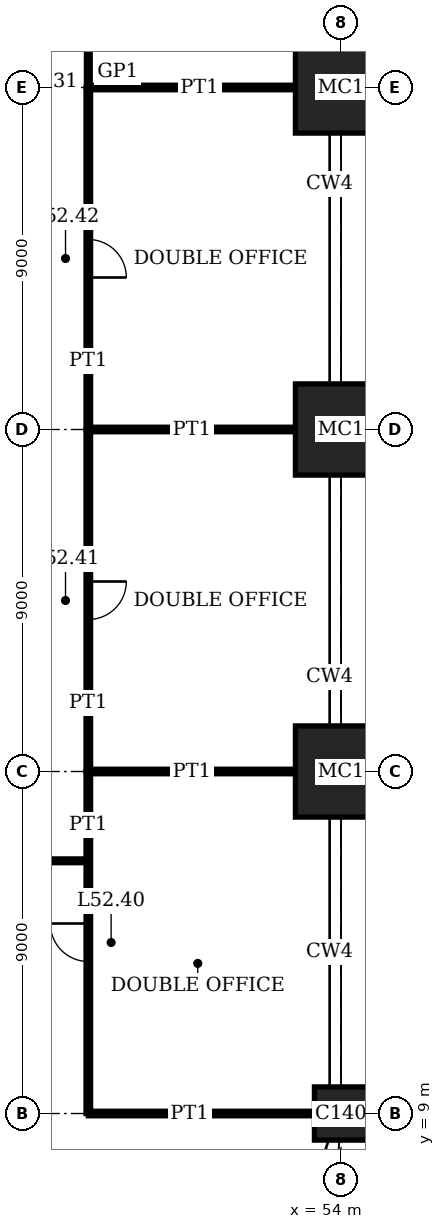
"""IFC4 building model, lengths in metres.
Left out: names, types, materials, properties, quantities, classifications, styles, units other than length and angle.
Written with IfcOpenShell. Run it as: python <this file> out.ifc"""

import sys

from ifc_helpers import new_model, si_unit, direction, frame, frame_2d, origin, origin_2d, place, context, subcontext, project, spatial, rectangle, extrude, element, fill, save


model = new_model("IFC4")
c1 = context("Model", 3, precision=1e-05, world=origin(), true_north=direction((0.0, 1.0)))
c2 = subcontext(c1, "Body", "Model", "MODEL_VIEW")
j1 = project(units=[si_unit("LENGTHUNIT", "METRE"), si_unit("PLANEANGLEUNIT", "RADIAN")], contexts=[c1])
p1 = place(None, origin())
s1 = spatial("IfcSite", under=j1, at=p1, CompositionType="ELEMENT")
p2 = place(p1, origin())
s2 = spatial("IfcBuilding", under=s1, at=p2, CompositionType="ELEMENT")
p3 = place(p2, frame((0.0, 0.0, 214.2)))
s3 = spatial("IfcBuildingStorey", under=s2, at=p3, CompositionType="ELEMENT", Elevation=214.2)
p4 = place(p3, frame((54.0, 9.0, 0.0), z_axis=(0.0, 0.0, 1.0), x_axis=(1.0, 0.0, 0.0)))
e1 = element("IfcColumn", 1, at=p4, inside=s3, PredefinedType="COLUMN", context=c2, shape_type="SweptSolid", body=[
    extrude(rectangle(XDim=1.4, YDim=1.4, at=origin_2d()), origin(), (0.0, 0.0, 1.0), 4.0),
])
for number, where, z_axis, x_axis in (
    (2, (54.0, 18.0, 0.0), (0.0, 0.0, 1.0), (1.0, 0.0, 0.0)),
    (3, (54.0, 27.0, 0.0), (0.0, 0.0, 1.0), (1.0, 0.0, 0.0)),
    (4, (54.0, 36.0, 0.0), (0.0, 0.0, 1.0), (1.0, 0.0, 0.0)),
):
    element("IfcColumn", number, at=place(p3, frame(where, z_axis=z_axis, x_axis=x_axis)), inside=s3, PredefinedType="COLUMN", context=c2, shape_type="SweptSolid", body=[
        extrude(rectangle(XDim=2.4, YDim=2.4, at=origin_2d()), origin(), (0.0, 0.0, 1.0), 4.0),
    ])
p5 = place(p3, frame((47.35, 9.0, 0.0), z_axis=(0.0, 0.0, 1.0), x_axis=(1.0, 0.0, 0.0)))
e5 = element("IfcWall", 5, at=p5, inside=s3, PredefinedType="PARTITIONING", context=c2, shape_type="SweptSolid", body=[
    extrude(rectangle(XDim=5.95, YDim=0.12, at=frame_2d((2.975, 0.0))), origin(), (0.0, 0.0, 1.0), 3.05),
])
p6 = place(p3, frame((40.5, 15.65, 0.0), z_axis=(0.0, 0.0, 1.0), x_axis=(1.0, 0.0, 0.0)))
e6 = element("IfcWall", 6, at=p6, inside=s3, PredefinedType="PARTITIONING", context=c2, shape_type="SweptSolid", body=[
    extrude(rectangle(XDim=6.85, YDim=0.1, at=frame_2d((3.425, 0.0))), origin(), (0.0, 0.0, 1.0), 3.75),
])
for number, where, z_axis, x_axis in (
    (7, (47.35, 18.0, 0.0), (0.0, 0.0, 1.0), (1.0, 0.0, 0.0)),
    (8, (47.35, 27.0, 0.0), (0.0, 0.0, 1.0), (1.0, 0.0, 0.0)),
    (9, (47.35, 36.0, 0.0), (0.0, 0.0, 1.0), (1.0, 0.0, 0.0)),
):
    element("IfcWall", number, at=place(p3, frame(where, z_axis=z_axis, x_axis=x_axis)), inside=s3, PredefinedType="PARTITIONING", context=c2, shape_type="SweptSolid", body=[
        extrude(rectangle(XDim=5.45, YDim=0.12, at=frame_2d((2.725, 0.0))), origin(), (0.0, 0.0, 1.0), 3.05),
    ])
p7 = place(p3, frame((47.35, 9.0, 0.0), z_axis=(0.0, 0.0, 1.0), x_axis=(0.0, 1.0, 0.0)))
e10 = element("IfcWall", 10, at=p7, inside=s3, PredefinedType="PARTITIONING", context=c2, shape_type="SweptSolid", body=[
    extrude(rectangle(XDim=9.0, YDim=0.12, at=frame_2d((4.5, 0.0))), origin(), (0.0, 0.0, 1.0), 3.75),
])
p8 = place(p7, frame((4.0, 0.0, 0.0)))
e11 = element("IfcOpeningElement", 11, at=p8, cuts=e10, PredefinedType="OPENING", context=c2, shape_type="SweptSolid", body=[
    extrude(rectangle(XDim=1.0, YDim=2.4, at=frame_2d((0.5, 1.2))), frame((0.0, 0.07, 0.0), z_axis=(0.0, -1.0, 0.0), x_axis=(1.0, 0.0, 0.0)), (0.0, 0.0, 1.0), 0.14),
])
p9 = place(p3, frame((47.35, 18.0, 0.0), z_axis=(0.0, 0.0, 1.0), x_axis=(0.0, 1.0, 0.0)))
e12 = element("IfcWall", 12, at=p9, inside=s3, PredefinedType="PARTITIONING", context=c2, shape_type="SweptSolid", body=[
    extrude(rectangle(XDim=9.0, YDim=0.12, at=frame_2d((4.5, 0.0))), origin(), (0.0, 0.0, 1.0), 3.75),
])
p10 = place(p9, frame((4.0, 0.0, 0.0)))
e13 = element("IfcOpeningElement", 13, at=p10, cuts=e12, PredefinedType="OPENING", context=c2, shape_type="SweptSolid", body=[
    extrude(rectangle(XDim=1.0, YDim=2.4, at=frame_2d((0.5, 1.2))), frame((0.0, 0.07, 0.0), z_axis=(0.0, -1.0, 0.0), x_axis=(1.0, 0.0, 0.0)), (0.0, 0.0, 1.0), 0.14),
])
p11 = place(p3, frame((47.35, 27.0, 0.0), z_axis=(0.0, 0.0, 1.0), x_axis=(0.0, 1.0, 0.0)))
e14 = element("IfcWall", 14, at=p11, inside=s3, PredefinedType="PARTITIONING", context=c2, shape_type="SweptSolid", body=[
    extrude(rectangle(XDim=9.0, YDim=0.12, at=frame_2d((4.5, 0.0))), origin(), (0.0, 0.0, 1.0), 3.75),
])
p12 = place(p11, frame((4.0, 0.0, 0.0)))
e15 = element("IfcOpeningElement", 15, at=p12, cuts=e14, PredefinedType="OPENING", context=c2, shape_type="SweptSolid", body=[
    extrude(rectangle(XDim=1.0, YDim=2.4, at=frame_2d((0.5, 1.2))), frame((0.0, 0.07, 0.0), z_axis=(0.0, -1.0, 0.0), x_axis=(1.0, 0.0, 0.0)), (0.0, 0.0, 1.0), 0.14),
])
p13 = place(p3, frame((47.35, 36.0, 0.0), z_axis=(0.0, 0.0, 1.0), x_axis=(0.0, 1.0, 0.0)))
e16 = element("IfcWall", 16, at=p13, inside=s3, PredefinedType="PARTITIONING", context=c2, shape_type="SweptSolid", body=[
    extrude(rectangle(XDim=2.35, YDim=0.1, at=frame_2d((1.175, 0.0))), origin(), (0.0, 0.0, 1.0), 3.75),
])
p14 = place(p8, origin())
e17 = element("IfcDoor", 17, at=p14, inside=s3, OperationType="SINGLE_SWING_LEFT", PredefinedType="DOOR", context=c2, shape_type="SweptSolid", body=[
    extrude(rectangle(XDim=1.0, YDim=2.4, at=frame_2d((0.5, 1.2))), frame((0.0, 0.025, 0.0), z_axis=(0.0, -1.0, 0.0), x_axis=(1.0, 0.0, 0.0)), (0.0, 0.0, 1.0), 0.05),
])
fill(e11, e17)
p15 = place(p10, origin())
e18 = element("IfcDoor", 18, at=p15, inside=s3, OperationType="SINGLE_SWING_RIGHT", PredefinedType="DOOR", context=c2, shape_type="SweptSolid", body=[
    extrude(rectangle(XDim=1.0, YDim=2.4, at=frame_2d((0.5, 1.2))), frame((0.0, 0.025, 0.0), z_axis=(0.0, -1.0, 0.0), x_axis=(1.0, 0.0, 0.0)), (0.0, 0.0, 1.0), 0.05),
])
fill(e13, e18)
p16 = place(p12, origin())
e19 = element("IfcDoor", 19, at=p16, inside=s3, OperationType="SINGLE_SWING_LEFT", PredefinedType="DOOR", context=c2, shape_type="SweptSolid", body=[
    extrude(rectangle(XDim=1.0, YDim=2.4, at=frame_2d((0.5, 1.2))), frame((0.0, 0.025, 0.0), z_axis=(0.0, -1.0, 0.0), x_axis=(1.0, 0.0, 0.0)), (0.0, 0.0, 1.0), 0.05),
])
fill(e15, e19)
save(model, sys.argv[1])
